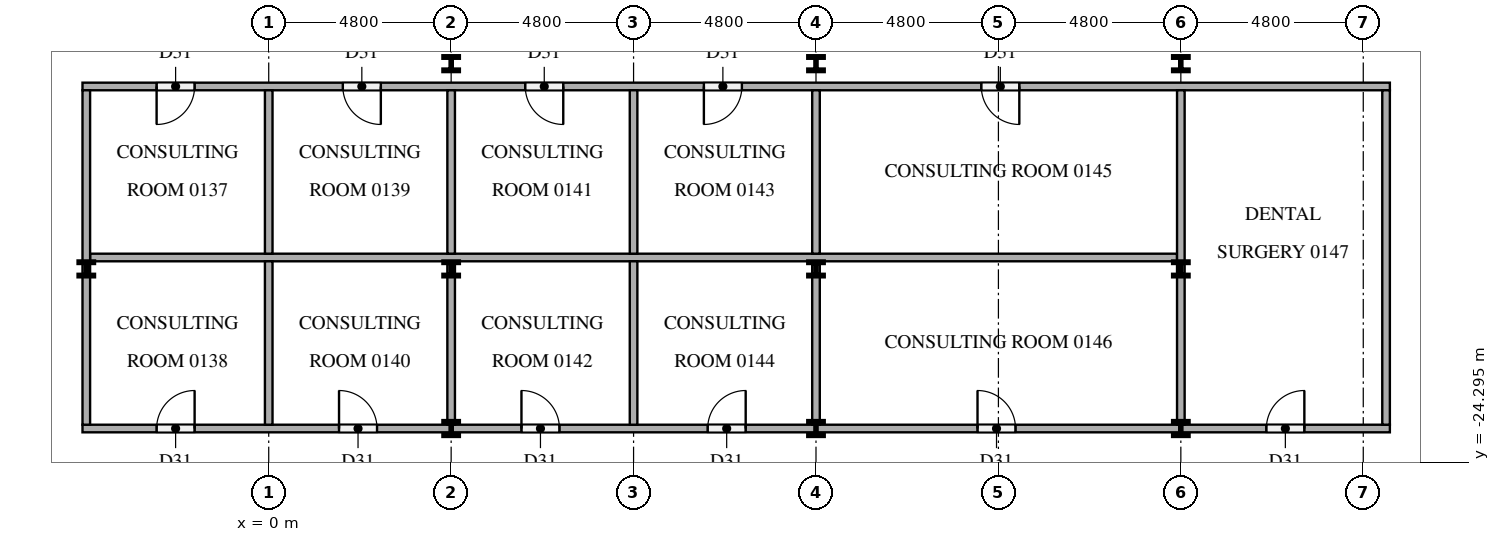
"""IFC4 building model, lengths in metres.
Left out: names, types, materials, properties, quantities, classifications, styles, units other than length and angle.
Written with IfcOpenShell. Run it as: python <this file> out.ifc"""

import sys

from ifc_helpers import new_model, si_unit, direction, frame, frame_2d, origin, origin_2d, place, context, subcontext, project, spatial, rectangle, i_section, extrude, element, fill, save


model = new_model("IFC4")
c1 = context("Model", 3, precision=1e-05, world=origin(), true_north=direction((0.0, 1.0)))
c2 = subcontext(c1, "Body", "Model", "MODEL_VIEW")
j1 = project(units=[si_unit("LENGTHUNIT", "METRE"), si_unit("PLANEANGLEUNIT", "RADIAN")], contexts=[c1])
p1 = place(None, origin())
s1 = spatial("IfcSite", under=j1, at=p1, CompositionType="ELEMENT")
p2 = place(p1, origin())
s2 = spatial("IfcBuilding", under=s1, at=p2, CompositionType="ELEMENT")
p3 = place(p2, frame((0.0, 0.0, 6.0)))
s3 = spatial("IfcBuildingStorey", under=s2, at=p3, CompositionType="ELEMENT", Elevation=6.0)
for number, where, z_axis, x_axis in (
    (1, (-4.8, -19.2, 0.0), (0.0, 0.0, 1.0), (1.0, 0.0, 0.0)),
    (2, (4.8, -23.4, 0.0), (0.0, 0.0, 1.0), (1.0, 0.0, 0.0)),
    (3, (4.8, -19.2, 0.0), (0.0, 0.0, 1.0), (1.0, 0.0, 0.0)),
    (4, (4.8, -13.8, 0.0), (0.0, 0.0, 1.0), (1.0, 0.0, 0.0)),
    (5, (14.4, -23.4, 0.0), (0.0, 0.0, 1.0), (1.0, 0.0, 0.0)),
    (6, (14.4, -19.2, 0.0), (0.0, 0.0, 1.0), (1.0, 0.0, 0.0)),
    (7, (14.4, -13.8, 0.0), (0.0, 0.0, 1.0), (1.0, 0.0, 0.0)),
    (8, (24.0, -23.4, 0.0), (0.0, 0.0, 1.0), (1.0, 0.0, 0.0)),
    (9, (24.0, -19.2, 0.0), (0.0, 0.0, 1.0), (1.0, 0.0, 0.0)),
    (10, (24.0, -13.8, 0.0), (0.0, 0.0, 1.0), (1.0, 0.0, 0.0)),
):
    element("IfcColumn", number, at=place(p3, frame(where, z_axis=z_axis, x_axis=x_axis)), inside=s3, PredefinedType="COLUMN", context=c2, shape_type="SweptSolid", body=[
        extrude(i_section(OverallWidth=0.396, OverallDepth=0.381, WebThickness=0.019, FlangeThickness=0.03, at=origin_2d()), origin(), (0.0, 0.0, 1.0), 4.2),
    ])
p4 = place(p3, frame((-4.9, -23.4, 0.0), z_axis=(0.0, 0.0, 1.0), x_axis=(1.0, 0.0, 0.0)))
e11 = element("IfcWall", 11, at=p4, inside=s3, PredefinedType="PARTITIONING", context=c2, shape_type="SweptSolid", body=[
    extrude(rectangle(XDim=34.4, YDim=0.2, at=frame_2d((17.2, 0.0))), origin(), (0.0, 0.0, 1.0), 4.2),
])
p5 = place(p4, frame((1.95, 0.0, 0.0)))
e12 = element("IfcOpeningElement", 12, at=p5, cuts=e11, PredefinedType="OPENING", context=c2, shape_type="SweptSolid", body=[
    extrude(rectangle(XDim=1.0, YDim=2.1, at=frame_2d((0.5, 1.05))), frame((0.0, 0.11, 0.0), z_axis=(0.0, -1.0, 0.0), x_axis=(1.0, 0.0, 0.0)), (0.0, 0.0, 1.0), 0.22),
])
p6 = place(p4, frame((6.75, 0.0, 0.0)))
e13 = element("IfcOpeningElement", 13, at=p6, cuts=e11, PredefinedType="OPENING", context=c2, shape_type="SweptSolid", body=[
    extrude(rectangle(XDim=1.0, YDim=2.1, at=frame_2d((0.5, 1.05))), frame((0.0, 0.11, 0.0), z_axis=(0.0, -1.0, 0.0), x_axis=(1.0, 0.0, 0.0)), (0.0, 0.0, 1.0), 0.22),
])
p7 = place(p4, frame((11.55, 0.0, 0.0)))
e14 = element("IfcOpeningElement", 14, at=p7, cuts=e11, PredefinedType="OPENING", context=c2, shape_type="SweptSolid", body=[
    extrude(rectangle(XDim=1.0, YDim=2.1, at=frame_2d((0.5, 1.05))), frame((0.0, 0.11, 0.0), z_axis=(0.0, -1.0, 0.0), x_axis=(1.0, 0.0, 0.0)), (0.0, 0.0, 1.0), 0.22),
])
p8 = place(p4, frame((16.45, 0.0, 0.0)))
e15 = element("IfcOpeningElement", 15, at=p8, cuts=e11, PredefinedType="OPENING", context=c2, shape_type="SweptSolid", body=[
    extrude(rectangle(XDim=1.0, YDim=2.1, at=frame_2d((0.5, 1.05))), frame((0.0, 0.11, 0.0), z_axis=(0.0, -1.0, 0.0), x_axis=(1.0, 0.0, 0.0)), (0.0, 0.0, 1.0), 0.22),
])
p9 = place(p4, frame((23.55, 0.0, 0.0)))
e16 = element("IfcOpeningElement", 16, at=p9, cuts=e11, PredefinedType="OPENING", context=c2, shape_type="SweptSolid", body=[
    extrude(rectangle(XDim=1.0, YDim=2.1, at=frame_2d((0.5, 1.05))), frame((0.0, 0.11, 0.0), z_axis=(0.0, -1.0, 0.0), x_axis=(1.0, 0.0, 0.0)), (0.0, 0.0, 1.0), 0.22),
])
p10 = place(p4, frame((31.15, 0.0, 0.0)))
e17 = element("IfcOpeningElement", 17, at=p10, cuts=e11, PredefinedType="OPENING", context=c2, shape_type="SweptSolid", body=[
    extrude(rectangle(XDim=1.0, YDim=2.1, at=frame_2d((0.5, 1.05))), frame((0.0, 0.11, 0.0), z_axis=(0.0, -1.0, 0.0), x_axis=(1.0, 0.0, 0.0)), (0.0, 0.0, 1.0), 0.22),
])
p11 = place(p3, frame((-4.7, -18.9, 0.0), z_axis=(0.0, 0.0, 1.0), x_axis=(1.0, 0.0, 0.0)))
e18 = element("IfcWall", 18, at=p11, inside=s3, PredefinedType="PARTITIONING", context=c2, shape_type="SweptSolid", body=[
    extrude(rectangle(XDim=28.6, YDim=0.2, at=frame_2d((14.3, 0.0))), origin(), (0.0, 0.0, 1.0), 4.2),
])
p12 = place(p3, frame((29.5, -14.4, 0.0), z_axis=(0.0, 0.0, 1.0), x_axis=(-1.0, 0.0, 0.0)))
e19 = element("IfcWall", 19, at=p12, inside=s3, PredefinedType="PARTITIONING", context=c2, shape_type="SweptSolid", body=[
    extrude(rectangle(XDim=34.4, YDim=0.2, at=frame_2d((17.2, 0.0))), origin(), (0.0, 0.0, 1.0), 4.2),
])
p13 = place(p12, frame((31.45, 0.0, 0.0)))
e20 = element("IfcOpeningElement", 20, at=p13, cuts=e19, PredefinedType="OPENING", context=c2, shape_type="SweptSolid", body=[
    extrude(rectangle(XDim=1.0, YDim=2.1, at=frame_2d((0.5, 1.05))), frame((0.0, 0.11, 0.0), z_axis=(0.0, -1.0, 0.0), x_axis=(1.0, 0.0, 0.0)), (0.0, 0.0, 1.0), 0.22),
])
p14 = place(p12, frame((26.55, 0.0, 0.0)))
e21 = element("IfcOpeningElement", 21, at=p14, cuts=e19, PredefinedType="OPENING", context=c2, shape_type="SweptSolid", body=[
    extrude(rectangle(XDim=1.0, YDim=2.1, at=frame_2d((0.5, 1.05))), frame((0.0, 0.11, 0.0), z_axis=(0.0, -1.0, 0.0), x_axis=(1.0, 0.0, 0.0)), (0.0, 0.0, 1.0), 0.22),
])
p15 = place(p12, frame((21.75, 0.0, 0.0)))
e22 = element("IfcOpeningElement", 22, at=p15, cuts=e19, PredefinedType="OPENING", context=c2, shape_type="SweptSolid", body=[
    extrude(rectangle(XDim=1.0, YDim=2.1, at=frame_2d((0.5, 1.05))), frame((0.0, 0.11, 0.0), z_axis=(0.0, -1.0, 0.0), x_axis=(1.0, 0.0, 0.0)), (0.0, 0.0, 1.0), 0.22),
])
p16 = place(p12, frame((17.05, 0.0, 0.0)))
e23 = element("IfcOpeningElement", 23, at=p16, cuts=e19, PredefinedType="OPENING", context=c2, shape_type="SweptSolid", body=[
    extrude(rectangle(XDim=1.0, YDim=2.1, at=frame_2d((0.5, 1.05))), frame((0.0, 0.11, 0.0), z_axis=(0.0, -1.0, 0.0), x_axis=(1.0, 0.0, 0.0)), (0.0, 0.0, 1.0), 0.22),
])
p17 = place(p12, frame((9.75, 0.0, 0.0)))
e24 = element("IfcOpeningElement", 24, at=p17, cuts=e19, PredefinedType="OPENING", context=c2, shape_type="SweptSolid", body=[
    extrude(rectangle(XDim=1.0, YDim=2.1, at=frame_2d((0.5, 1.05))), frame((0.0, 0.11, 0.0), z_axis=(0.0, -1.0, 0.0), x_axis=(1.0, 0.0, 0.0)), (0.0, 0.0, 1.0), 0.22),
])
p18 = place(p3, frame((-4.8, -23.3, 0.0), z_axis=(0.0, 0.0, 1.0), x_axis=(0.0, 1.0, 0.0)))
e25 = element("IfcWall", 25, at=p18, inside=s3, PredefinedType="PARTITIONING", context=c2, shape_type="SweptSolid", body=[
    extrude(rectangle(XDim=8.8, YDim=0.2, at=frame_2d((4.4, 0.0))), origin(), (0.0, 0.0, 1.0), 4.2),
])
for number, where, z_axis, x_axis in (
    (26, (0.0, -23.3, 0.0), (0.0, 0.0, 1.0), (0.0, 1.0, 0.0)),
    (27, (0.0, -18.8, 0.0), (0.0, 0.0, 1.0), (0.0, 1.0, 0.0)),
    (28, (4.8, -23.3, 0.0), (0.0, 0.0, 1.0), (0.0, 1.0, 0.0)),
    (29, (4.8, -18.8, 0.0), (0.0, 0.0, 1.0), (0.0, 1.0, 0.0)),
    (30, (9.6, -23.3, 0.0), (0.0, 0.0, 1.0), (0.0, 1.0, 0.0)),
    (31, (9.6, -18.8, 0.0), (0.0, 0.0, 1.0), (0.0, 1.0, 0.0)),
    (32, (14.4, -23.3, 0.0), (0.0, 0.0, 1.0), (0.0, 1.0, 0.0)),
    (33, (14.4, -18.8, 0.0), (0.0, 0.0, 1.0), (0.0, 1.0, 0.0)),
):
    element("IfcWall", number, at=place(p3, frame(where, z_axis=z_axis, x_axis=x_axis)), inside=s3, PredefinedType="PARTITIONING", context=c2, shape_type="SweptSolid", body=[
        extrude(rectangle(XDim=4.3, YDim=0.2, at=frame_2d((2.15, 0.0))), origin(), (0.0, 0.0, 1.0), 4.2),
    ])
for number, where, z_axis, x_axis in (
    (34, (24.0, -23.3, 0.0), (0.0, 0.0, 1.0), (0.0, 1.0, 0.0)),
    (35, (29.4, -23.3, 0.0), (0.0, 0.0, 1.0), (0.0, 1.0, 0.0)),
):
    element("IfcWall", number, at=place(p3, frame(where, z_axis=z_axis, x_axis=x_axis)), inside=s3, PredefinedType="PARTITIONING", context=c2, shape_type="SweptSolid", body=[
        extrude(rectangle(XDim=8.8, YDim=0.2, at=frame_2d((4.4, 0.0))), origin(), (0.0, 0.0, 1.0), 4.2),
    ])
p19 = place(p13, origin())
e36 = element("IfcDoor", 36, at=p19, inside=s3, OperationType="SINGLE_SWING_RIGHT", PredefinedType="DOOR", context=c2, shape_type="SweptSolid", body=[
    extrude(rectangle(XDim=1.0, YDim=2.1, at=frame_2d((0.5, 1.05))), frame((0.0, 0.025, 0.0), z_axis=(0.0, -1.0, 0.0), x_axis=(1.0, 0.0, 0.0)), (0.0, 0.0, 1.0), 0.05),
])
fill(e20, e36)
p20 = place(p5, origin())
e37 = element("IfcDoor", 37, at=p20, inside=s3, OperationType="SINGLE_SWING_RIGHT", PredefinedType="DOOR", context=c2, shape_type="SweptSolid", body=[
    extrude(rectangle(XDim=1.0, YDim=2.1, at=frame_2d((0.5, 1.05))), frame((0.0, 0.025, 0.0), z_axis=(0.0, -1.0, 0.0), x_axis=(1.0, 0.0, 0.0)), (0.0, 0.0, 1.0), 0.05),
])
fill(e12, e37)
p21 = place(p14, origin())
e38 = element("IfcDoor", 38, at=p21, inside=s3, OperationType="SINGLE_SWING_LEFT", PredefinedType="DOOR", context=c2, shape_type="SweptSolid", body=[
    extrude(rectangle(XDim=1.0, YDim=2.1, at=frame_2d((0.5, 1.05))), frame((0.0, 0.025, 0.0), z_axis=(0.0, -1.0, 0.0), x_axis=(1.0, 0.0, 0.0)), (0.0, 0.0, 1.0), 0.05),
])
fill(e21, e38)
p22 = place(p6, origin())
e39 = element("IfcDoor", 39, at=p22, inside=s3, OperationType="SINGLE_SWING_LEFT", PredefinedType="DOOR", context=c2, shape_type="SweptSolid", body=[
    extrude(rectangle(XDim=1.0, YDim=2.1, at=frame_2d((0.5, 1.05))), frame((0.0, 0.025, 0.0), z_axis=(0.0, -1.0, 0.0), x_axis=(1.0, 0.0, 0.0)), (0.0, 0.0, 1.0), 0.05),
])
fill(e13, e39)
p23 = place(p15, origin())
e40 = element("IfcDoor", 40, at=p23, inside=s3, OperationType="SINGLE_SWING_LEFT", PredefinedType="DOOR", context=c2, shape_type="SweptSolid", body=[
    extrude(rectangle(XDim=1.0, YDim=2.1, at=frame_2d((0.5, 1.05))), frame((0.0, 0.025, 0.0), z_axis=(0.0, -1.0, 0.0), x_axis=(1.0, 0.0, 0.0)), (0.0, 0.0, 1.0), 0.05),
])
fill(e22, e40)
p24 = place(p7, origin())
e41 = element("IfcDoor", 41, at=p24, inside=s3, OperationType="SINGLE_SWING_LEFT", PredefinedType="DOOR", context=c2, shape_type="SweptSolid", body=[
    extrude(rectangle(XDim=1.0, YDim=2.1, at=frame_2d((0.5, 1.05))), frame((0.0, 0.025, 0.0), z_axis=(0.0, -1.0, 0.0), x_axis=(1.0, 0.0, 0.0)), (0.0, 0.0, 1.0), 0.05),
])
fill(e14, e41)
p25 = place(p16, origin())
e42 = element("IfcDoor", 42, at=p25, inside=s3, OperationType="SINGLE_SWING_RIGHT", PredefinedType="DOOR", context=c2, shape_type="SweptSolid", body=[
    extrude(rectangle(XDim=1.0, YDim=2.1, at=frame_2d((0.5, 1.05))), frame((0.0, 0.025, 0.0), z_axis=(0.0, -1.0, 0.0), x_axis=(1.0, 0.0, 0.0)), (0.0, 0.0, 1.0), 0.05),
])
fill(e23, e42)
p26 = place(p8, origin())
e43 = element("IfcDoor", 43, at=p26, inside=s3, OperationType="SINGLE_SWING_RIGHT", PredefinedType="DOOR", context=c2, shape_type="SweptSolid", body=[
    extrude(rectangle(XDim=1.0, YDim=2.1, at=frame_2d((0.5, 1.05))), frame((0.0, 0.025, 0.0), z_axis=(0.0, -1.0, 0.0), x_axis=(1.0, 0.0, 0.0)), (0.0, 0.0, 1.0), 0.05),
])
fill(e15, e43)
p27 = place(p17, origin())
e44 = element("IfcDoor", 44, at=p27, inside=s3, OperationType="SINGLE_SWING_LEFT", PredefinedType="DOOR", context=c2, shape_type="SweptSolid", body=[
    extrude(rectangle(XDim=1.0, YDim=2.1, at=frame_2d((0.5, 1.05))), frame((0.0, 0.025, 0.0), z_axis=(0.0, -1.0, 0.0), x_axis=(1.0, 0.0, 0.0)), (0.0, 0.0, 1.0), 0.05),
])
fill(e24, e44)
p28 = place(p9, origin())
e45 = element("IfcDoor", 45, at=p28, inside=s3, OperationType="SINGLE_SWING_LEFT", PredefinedType="DOOR", context=c2, shape_type="SweptSolid", body=[
    extrude(rectangle(XDim=1.0, YDim=2.1, at=frame_2d((0.5, 1.05))), frame((0.0, 0.025, 0.0), z_axis=(0.0, -1.0, 0.0), x_axis=(1.0, 0.0, 0.0)), (0.0, 0.0, 1.0), 0.05),
])
fill(e16, e45)
p29 = place(p10, origin())
e46 = element("IfcDoor", 46, at=p29, inside=s3, OperationType="SINGLE_SWING_RIGHT", PredefinedType="DOOR", context=c2, shape_type="SweptSolid", body=[
    extrude(rectangle(XDim=1.0, YDim=2.1, at=frame_2d((0.5, 1.05))), frame((0.0, 0.025, 0.0), z_axis=(0.0, -1.0, 0.0), x_axis=(1.0, 0.0, 0.0)), (0.0, 0.0, 1.0), 0.05),
])
fill(e17, e46)
save(model, sys.argv[1])
